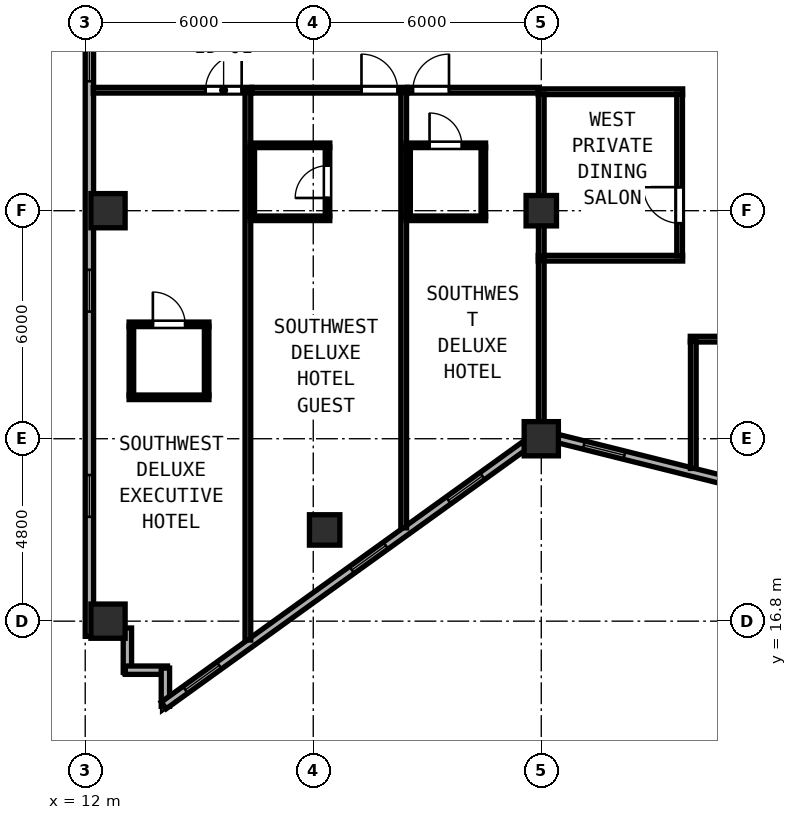
"""IFC4 building model, lengths in metres.
Left out: names, types, materials, properties, quantities, classifications, styles, units other than length and angle.
Written with IfcOpenShell. Run it as: python <this file> out.ifc"""

import sys

from ifc_helpers import new_model, si_unit, direction, frame, frame_2d, origin, origin_2d, place, context, subcontext, project, spatial, rectangle, hollow_rectangle, extrude, element, fill, save


model = new_model("IFC4")
c1 = context("Model", 3, precision=1e-05, world=origin(), true_north=direction((0.0, 1.0)))
c2 = subcontext(c1, "Body", "Model", "MODEL_VIEW")
j1 = project(units=[si_unit("LENGTHUNIT", "METRE"), si_unit("PLANEANGLEUNIT", "RADIAN")], contexts=[c1])
p1 = place(None, origin())
s1 = spatial("IfcSite", under=j1, at=p1, CompositionType="ELEMENT")
p2 = place(p1, origin())
s2 = spatial("IfcBuilding", under=s1, at=p2, CompositionType="ELEMENT")
p3 = place(p2, frame((0.0, 0.0, 223.0)))
s3 = spatial("IfcBuildingStorey", under=s2, at=p3, CompositionType="ELEMENT", Elevation=223.0)
for number, where, z_axis, x_axis in (
    (1, (24.0, 21.6, 0.0), (0.0, 0.0, 1.0), (1.0, 0.0, 0.0)),
    (2, (12.6, 16.8, 0.0), (0.0, 0.0, 1.0), (1.0, 0.0, 0.0)),
    (3, (12.6, 27.6, 0.0), (0.0, 0.0, 1.0), (1.0, 0.0, 0.0)),
):
    element("IfcColumn", number, at=place(p3, frame(where, z_axis=z_axis, x_axis=x_axis)), inside=s3, PredefinedType="COLUMN", context=c2, shape_type="SweptSolid", body=[
        extrude(hollow_rectangle(XDim=0.9, YDim=0.9, WallThickness=0.034, at=origin_2d()), origin(), (0.0, 0.0, 1.0), 3.8),
    ])
for number, where, z_axis, x_axis in (
    (4, (24.0, 27.6, 0.0), (0.0, 0.0, 1.0), (1.0, 0.0, 0.0)),
    (5, (18.3, 19.2, 0.0), (0.0, 0.0, 1.0), (1.0, 0.0, 0.0)),
):
    element("IfcColumn", number, at=place(p3, frame(where, z_axis=z_axis, x_axis=x_axis)), inside=s3, PredefinedType="COLUMN", context=c2, shape_type="SweptSolid", body=[
        extrude(hollow_rectangle(XDim=0.8, YDim=0.8, WallThickness=0.03, at=origin_2d()), origin(), (0.0, 0.0, 1.0), 3.8),
    ])
p4 = place(p3, frame((12.11, 37.545, 0.0), z_axis=(0.0, 0.0, 1.0), x_axis=(0.0, -1.0, 0.0)))
e6 = element("IfcWall", 6, at=p4, inside=s3, PredefinedType="SOLIDWALL", context=c2, shape_type="SweptSolid", body=[
    extrude(rectangle(XDim=21.145, YDim=0.22, at=frame_2d((10.573, 0.0))), origin(), (0.0, 0.0, 1.0), 3.62),
])
p5 = place(p4, frame((0.7, 0.0, 0.85)))
e7 = element("IfcOpeningElement", 7, at=p5, cuts=e6, PredefinedType="OPENING", context=c2, shape_type="SweptSolid", body=[
    extrude(rectangle(XDim=1.1, YDim=1.75, at=frame_2d((0.55, 0.875))), frame((0.0, 0.12, 0.0), z_axis=(0.0, -1.0, 0.0), x_axis=(1.0, 0.0, 0.0)), (0.0, 0.0, 1.0), 0.24),
])
p6 = place(p4, frame((5.44, 0.0, 0.85)))
e8 = element("IfcOpeningElement", 8, at=p6, cuts=e6, PredefinedType="OPENING", context=c2, shape_type="SweptSolid", body=[
    extrude(rectangle(XDim=1.1, YDim=1.75, at=frame_2d((0.55, 0.875))), frame((0.0, 0.12, 0.0), z_axis=(0.0, -1.0, 0.0), x_axis=(1.0, 0.0, 0.0)), (0.0, 0.0, 1.0), 0.24),
])
p7 = place(p4, frame((11.5, 0.0, 0.85)))
e9 = element("IfcOpeningElement", 9, at=p7, cuts=e6, PredefinedType="OPENING", context=c2, shape_type="SweptSolid", body=[
    extrude(rectangle(XDim=1.1, YDim=1.75, at=frame_2d((0.55, 0.875))), frame((0.0, 0.12, 0.0), z_axis=(0.0, -1.0, 0.0), x_axis=(1.0, 0.0, 0.0)), (0.0, 0.0, 1.0), 0.24),
])
p8 = place(p4, frame((16.9, 0.0, 0.85)))
e10 = element("IfcOpeningElement", 10, at=p8, cuts=e6, PredefinedType="OPENING", context=c2, shape_type="SweptSolid", body=[
    extrude(rectangle(XDim=1.1, YDim=1.75, at=frame_2d((0.55, 0.875))), frame((0.0, 0.12, 0.0), z_axis=(0.0, -1.0, 0.0), x_axis=(1.0, 0.0, 0.0)), (0.0, 0.0, 1.0), 0.24),
])
p9 = place(p3, frame((13.11, 16.62, 0.0), z_axis=(0.0, 0.0, 1.0), x_axis=(0.0, -1.0, 0.0)))
e11 = element("IfcWall", 11, at=p9, inside=s3, PredefinedType="SOLIDWALL", context=c2, shape_type="SweptSolid", body=[
    extrude(rectangle(XDim=1.165, YDim=0.22, at=frame_2d((0.583, 0.0))), origin(), (0.0, 0.0, 1.0), 3.62),
])
p10 = place(p3, frame((13.055, 15.51, 0.0), z_axis=(0.0, 0.0, 1.0), x_axis=(1.0, 0.0, 0.0)))
e12 = element("IfcWall", 12, at=p10, inside=s3, PredefinedType="SOLIDWALL", context=c2, shape_type="SweptSolid", body=[
    extrude(rectangle(XDim=1.11, YDim=0.22, at=frame_2d((0.555, 0.0))), origin(), (0.0, 0.0, 1.0), 3.62),
])
p11 = place(p3, frame((14.11, 15.565, 0.0), z_axis=(0.0, 0.0, 1.0), x_axis=(0.0, -1.0, 0.0)))
e13 = element("IfcWall", 13, at=p11, inside=s3, PredefinedType="SOLIDWALL", context=c2, shape_type="SweptSolid", body=[
    extrude(rectangle(XDim=1.005, YDim=0.22, at=frame_2d((0.502, 0.0))), origin(), (0.0, 0.0, 1.0), 3.62),
])
p12 = place(p3, frame((14.065, 14.583, 0.0), z_axis=(0.0, 0.0, 1.0), x_axis=(0.811534737332, 0.58430417601, 0.0)))
e14 = element("IfcWall", 14, at=p12, inside=s3, PredefinedType="SOLIDWALL", context=c2, shape_type="SweptSolid", body=[
    extrude(rectangle(XDim=11.697, YDim=0.22, at=frame_2d((5.849, 0.0))), origin(), (0.0, 0.0, 1.0), 3.215),
])
p13 = place(p12, frame((0.7, 0.0, 0.85)))
e15 = element("IfcOpeningElement", 15, at=p13, cuts=e14, PredefinedType="OPENING", context=c2, shape_type="SweptSolid", body=[
    extrude(rectangle(XDim=1.1, YDim=1.75, at=frame_2d((0.55, 0.875))), frame((0.0, 0.12, 0.0), z_axis=(0.0, -1.0, 0.0), x_axis=(1.0, 0.0, 0.0)), (0.0, 0.0, 1.0), 0.24),
])
p14 = place(p12, frame((6.1, 0.0, 0.85)))
e16 = element("IfcOpeningElement", 16, at=p14, cuts=e14, PredefinedType="OPENING", context=c2, shape_type="SweptSolid", body=[
    extrude(rectangle(XDim=1.1, YDim=1.75, at=frame_2d((0.55, 0.875))), frame((0.0, 0.12, 0.0), z_axis=(0.0, -1.0, 0.0), x_axis=(1.0, 0.0, 0.0)), (0.0, 0.0, 1.0), 0.24),
])
p15 = place(p12, frame((9.233, 0.0, 0.85)))
e17 = element("IfcOpeningElement", 17, at=p15, cuts=e14, PredefinedType="OPENING", context=c2, shape_type="SweptSolid", body=[
    extrude(rectangle(XDim=1.1, YDim=1.75, at=frame_2d((0.55, 0.875))), frame((0.0, 0.12, 0.0), z_axis=(0.0, -1.0, 0.0), x_axis=(1.0, 0.0, 0.0)), (0.0, 0.0, 1.0), 0.24),
])
p16 = place(p3, frame((24.442, 21.603, 0.0), z_axis=(0.0, 0.0, 1.0), x_axis=(0.970145648609, -0.242523030833, 0.0)))
e18 = element("IfcWall", 18, at=p16, inside=s3, PredefinedType="SOLIDWALL", context=c2, shape_type="SweptSolid", body=[
    extrude(rectangle(XDim=4.561, YDim=0.22, at=frame_2d((2.281, 0.0))), origin(), (0.0, 0.0, 1.0), 3.215),
])
p17 = place(p16, frame((0.7, 0.0, 0.85)))
e19 = element("IfcOpeningElement", 19, at=p17, cuts=e18, PredefinedType="OPENING", context=c2, shape_type="SweptSolid", body=[
    extrude(rectangle(XDim=1.1, YDim=1.75, at=frame_2d((0.55, 0.875))), frame((0.0, 0.12, 0.0), z_axis=(0.0, -1.0, 0.0), x_axis=(1.0, 0.0, 0.0)), (0.0, 0.0, 1.0), 0.24),
])
for number, where, z_axis, x_axis in (
    (20, (23.92, 30.73, 0.0), (0.0, 0.0, 1.0), (1.0, 0.0, 0.0)),
    (21, (23.92, 26.35, 0.0), (0.0, 0.0, 1.0), (1.0, 0.0, 0.0)),
):
    element("IfcWall", number, at=place(p3, frame(where, z_axis=z_axis, x_axis=x_axis)), inside=s3, PredefinedType="PARTITIONING", context=c2, shape_type="SweptSolid", body=[
        extrude(rectangle(XDim=3.8, YDim=0.15, at=frame_2d((1.9, 0.0))), origin(), (0.0, 0.0, 1.0), 3.62),
    ])
p18 = place(p3, frame((24.0, 26.41, 0.0), z_axis=(0.0, 0.0, 1.0), x_axis=(0.0, 1.0, 0.0)))
e22 = element("IfcWall", 22, at=p18, inside=s3, PredefinedType="PARTITIONING", context=c2, shape_type="SweptSolid", body=[
    extrude(rectangle(XDim=4.26, YDim=0.15, at=frame_2d((2.13, 0.0))), origin(), (0.0, 0.0, 1.0), 3.215),
])
p19 = place(p3, frame((27.64, 26.41, 0.0), z_axis=(0.0, 0.0, 1.0), x_axis=(0.0, 1.0, 0.0)))
e23 = element("IfcWall", 23, at=p19, inside=s3, PredefinedType="PARTITIONING", context=c2, shape_type="SweptSolid", body=[
    extrude(rectangle(XDim=4.26, YDim=0.15, at=frame_2d((2.13, 0.0))), origin(), (0.0, 0.0, 1.0), 3.62),
])
p20 = place(p19, frame((1.81, 0.0, 0.0), z_axis=(0.0, 0.0, 1.0), x_axis=(-1.0, 0.0, 0.0)))
e24 = element("IfcOpeningElement", 24, at=p20, cuts=e23, PredefinedType="OPENING", context=c2, shape_type="SweptSolid", body=[
    extrude(rectangle(XDim=0.95, YDim=2.12, at=frame_2d((0.475, 1.06))), frame((0.0, 0.085, 0.0), z_axis=(0.0, -1.0, 0.0), x_axis=(1.0, 0.0, 0.0)), (0.0, 0.0, 1.0), 0.17),
])
p21 = place(p3, frame((27.92, 24.22, 0.0), z_axis=(0.0, 0.0, 1.0), x_axis=(1.0, 0.0, 0.0)))
e25 = element("IfcWall", 25, at=p21, inside=s3, PredefinedType="PARTITIONING", context=c2, shape_type="SweptSolid", body=[
    extrude(rectangle(XDim=7.36, YDim=0.15, at=frame_2d((3.68, 0.0))), origin(), (0.0, 0.0, 1.0), 3.62),
])
p22 = place(p21, frame((4.075, 0.0, 0.0), z_axis=(0.0, 0.0, 1.0), x_axis=(-1.0, 0.0, 0.0)))
e26 = element("IfcOpeningElement", 26, at=p22, cuts=e25, PredefinedType="OPENING", context=c2, shape_type="SweptSolid", body=[
    extrude(rectangle(XDim=0.95, YDim=2.12, at=frame_2d((0.475, 1.06))), frame((0.0, 0.085, 0.0), z_axis=(0.0, -1.0, 0.0), x_axis=(1.0, 0.0, 0.0)), (0.0, 0.0, 1.0), 0.17),
])
p23 = place(p3, frame((28.0, 20.819, 0.0), z_axis=(0.0, 0.0, 1.0), x_axis=(0.0, 1.0, 0.0)))
e27 = element("IfcWall", 27, at=p23, inside=s3, PredefinedType="PARTITIONING", context=c2, shape_type="SweptSolid", body=[
    extrude(rectangle(XDim=3.341, YDim=0.15, at=frame_2d((1.671, 0.0))), origin(), (0.0, 0.0, 1.0), 3.62),
])
p24 = place(p3, frame((12.212, 30.77, 0.0), z_axis=(0.0, 0.0, 1.0), x_axis=(1.0, 0.0, 0.0)))
e28 = element("IfcWall", 28, at=p24, inside=s3, PredefinedType="PARTITIONING", context=c2, shape_type="SweptSolid", body=[
    extrude(rectangle(XDim=4.168, YDim=0.15, at=frame_2d((2.084, 0.0))), origin(), (0.0, 0.0, 1.0), 3.62),
])
p25 = place(p24, frame((3.905, 0.0, 0.0), z_axis=(0.0, 0.0, 1.0), x_axis=(-1.0, 0.0, 0.0)))
e29 = element("IfcOpeningElement", 29, at=p25, cuts=e28, PredefinedType="OPENING", context=c2, shape_type="SweptSolid", body=[
    extrude(rectangle(XDim=0.95, YDim=2.18, at=frame_2d((0.475, 1.09))), frame((0.0, 0.085, 0.0), z_axis=(0.0, -1.0, 0.0), x_axis=(1.0, 0.0, 0.0)), (0.0, 0.0, 1.0), 0.17),
])
p26 = place(p3, frame((16.28, 16.303, 0.0), z_axis=(0.0, 0.0, 1.0), x_axis=(0.0, 1.0, 0.0)))
e30 = element("IfcWall", 30, at=p26, inside=s3, PredefinedType="PARTITIONING", context=c2, shape_type="SweptSolid", body=[
    extrude(rectangle(XDim=14.407, YDim=0.15, at=frame_2d((7.204, 0.0))), origin(), (0.0, 0.0, 1.0), 3.62),
])
p27 = place(p3, frame((13.155, 24.61, 0.0), z_axis=(0.0, 0.0, 1.0), x_axis=(1.0, 0.0, 0.0)))
e31 = element("IfcWall", 31, at=p27, inside=s3, PredefinedType="PARTITIONING", context=c2, shape_type="SweptSolid", body=[
    extrude(rectangle(XDim=2.1, YDim=0.12, at=frame_2d((1.05, 0.0))), origin(), (0.0, 0.0, 1.0), 3.62),
])
p28 = place(p27, frame((1.475, 0.0, 0.0), z_axis=(0.0, 0.0, 1.0), x_axis=(-1.0, 0.0, 0.0)))
e32 = element("IfcOpeningElement", 32, at=p28, cuts=e31, PredefinedType="OPENING", context=c2, shape_type="SweptSolid", body=[
    extrude(rectangle(XDim=0.85, YDim=2.1, at=frame_2d((0.425, 1.05))), frame((0.0, 0.07, 0.0), z_axis=(0.0, -1.0, 0.0), x_axis=(1.0, 0.0, 0.0)), (0.0, 0.0, 1.0), 0.14),
])
p29 = place(p3, frame((13.155, 22.69, 0.0), z_axis=(0.0, 0.0, 1.0), x_axis=(1.0, 0.0, 0.0)))
e33 = element("IfcWall", 33, at=p29, inside=s3, PredefinedType="PARTITIONING", context=c2, shape_type="SweptSolid", body=[
    extrude(rectangle(XDim=2.1, YDim=0.12, at=frame_2d((1.05, 0.0))), origin(), (0.0, 0.0, 1.0), 3.62),
])
for number, where, z_axis, x_axis in (
    (34, (13.215, 22.735, 0.0), (0.0, 0.0, 1.0), (0.0, 1.0, 0.0)),
    (35, (15.195, 22.735, 0.0), (0.0, 0.0, 1.0), (0.0, 1.0, 0.0)),
):
    element("IfcWall", number, at=place(p3, frame(where, z_axis=z_axis, x_axis=x_axis)), inside=s3, PredefinedType="PARTITIONING", context=c2, shape_type="SweptSolid", body=[
        extrude(rectangle(XDim=1.83, YDim=0.12, at=frame_2d((0.915, 0.0))), origin(), (0.0, 0.0, 1.0), 3.62),
    ])
p30 = place(p3, frame((16.382, 30.77, 0.0), z_axis=(0.0, 0.0, 1.0), x_axis=(1.0, 0.0, 0.0)))
e36 = element("IfcWall", 36, at=p30, inside=s3, PredefinedType="PARTITIONING", context=c2, shape_type="SweptSolid", body=[
    extrude(rectangle(XDim=4.098, YDim=0.15, at=frame_2d((2.049, 0.0))), origin(), (0.0, 0.0, 1.0), 3.62),
])
p31 = place(p30, frame((3.837, 0.0, 0.0), z_axis=(0.0, 0.0, 1.0), x_axis=(-1.0, 0.0, 0.0)))
e37 = element("IfcOpeningElement", 37, at=p31, cuts=e36, PredefinedType="OPENING", context=c2, shape_type="SweptSolid", body=[
    extrude(rectangle(XDim=0.95, YDim=2.15, at=frame_2d((0.475, 1.075))), frame((0.0, 0.085, 0.0), z_axis=(0.0, -1.0, 0.0), x_axis=(1.0, 0.0, 0.0)), (0.0, 0.0, 1.0), 0.17),
])
p32 = place(p3, frame((20.38, 19.255, 0.0), z_axis=(0.0, 0.0, 1.0), x_axis=(0.0, 1.0, 0.0)))
e38 = element("IfcWall", 38, at=p32, inside=s3, PredefinedType="PARTITIONING", context=c2, shape_type="SweptSolid", body=[
    extrude(rectangle(XDim=11.455, YDim=0.15, at=frame_2d((5.728, 0.0))), origin(), (0.0, 0.0, 1.0), 3.62),
])
p33 = place(p3, frame((16.34, 29.32, 0.0), z_axis=(0.0, 0.0, 1.0), x_axis=(1.0, 0.0, 0.0)))
e39 = element("IfcWall", 39, at=p33, inside=s3, PredefinedType="PARTITIONING", context=c2, shape_type="SweptSolid", body=[
    extrude(rectangle(XDim=2.095, YDim=0.12, at=frame_2d((1.047, 0.0))), origin(), (0.0, 0.0, 1.0), 3.62),
])
p34 = place(p3, frame((16.34, 27.4, 0.0), z_axis=(0.0, 0.0, 1.0), x_axis=(1.0, 0.0, 0.0)))
e40 = element("IfcWall", 40, at=p34, inside=s3, PredefinedType="PARTITIONING", context=c2, shape_type="SweptSolid", body=[
    extrude(rectangle(XDim=2.095, YDim=0.12, at=frame_2d((1.047, 0.0))), origin(), (0.0, 0.0, 1.0), 3.215),
])
p35 = place(p3, frame((16.395, 27.445, 0.0), z_axis=(0.0, 0.0, 1.0), x_axis=(0.0, 1.0, 0.0)))
e41 = element("IfcWall", 41, at=p35, inside=s3, PredefinedType="PARTITIONING", context=c2, shape_type="SweptSolid", body=[
    extrude(rectangle(XDim=1.83, YDim=0.12, at=frame_2d((0.915, 0.0))), origin(), (0.0, 0.0, 1.0), 3.62),
])
p36 = place(p3, frame((18.375, 27.445, 0.0), z_axis=(0.0, 0.0, 1.0), x_axis=(0.0, 1.0, 0.0)))
e42 = element("IfcWall", 42, at=p36, inside=s3, PredefinedType="PARTITIONING", context=c2, shape_type="SweptSolid", body=[
    extrude(rectangle(XDim=1.83, YDim=0.12, at=frame_2d((0.915, 0.0))), origin(), (0.0, 0.0, 1.0), 3.62),
])
p37 = place(p36, frame((0.49, 0.0, 0.0)))
e43 = element("IfcOpeningElement", 43, at=p37, cuts=e42, PredefinedType="OPENING", context=c2, shape_type="SweptSolid", body=[
    extrude(rectangle(XDim=0.85, YDim=2.1, at=frame_2d((0.425, 1.05))), frame((0.0, 0.07, 0.0), z_axis=(0.0, -1.0, 0.0), x_axis=(1.0, 0.0, 0.0)), (0.0, 0.0, 1.0), 0.14),
])
p38 = place(p3, frame((20.482, 30.77, 0.0), z_axis=(0.0, 0.0, 1.0), x_axis=(1.0, 0.0, 0.0)))
e44 = element("IfcWall", 44, at=p38, inside=s3, PredefinedType="PARTITIONING", context=c2, shape_type="SweptSolid", body=[
    extrude(rectangle(XDim=3.436, YDim=0.15, at=frame_2d((1.718, 0.0))), origin(), (0.0, 0.0, 1.0), 3.62),
])
p39 = place(p38, frame((1.09, 0.0, 0.0), z_axis=(0.0, 0.0, 1.0), x_axis=(-1.0, 0.0, 0.0)))
e45 = element("IfcOpeningElement", 45, at=p39, cuts=e44, PredefinedType="OPENING", context=c2, shape_type="SweptSolid", body=[
    extrude(rectangle(XDim=0.95, YDim=2.15, at=frame_2d((0.475, 1.075))), frame((0.0, 0.085, 0.0), z_axis=(0.0, -1.0, 0.0), x_axis=(1.0, 0.0, 0.0)), (0.0, 0.0, 1.0), 0.17),
])
p40 = place(p3, frame((24.0, 21.819, 0.0), z_axis=(0.0, 0.0, 1.0), x_axis=(0.0, 1.0, 0.0)))
e46 = element("IfcWall", 46, at=p40, inside=s3, PredefinedType="PARTITIONING", context=c2, shape_type="SweptSolid", body=[
    extrude(rectangle(XDim=4.471, YDim=0.15, at=frame_2d((2.236, 0.0))), origin(), (0.0, 0.0, 1.0), 3.215),
])
p41 = place(p3, frame((20.44, 29.32, 0.0), z_axis=(0.0, 0.0, 1.0), x_axis=(1.0, 0.0, 0.0)))
e47 = element("IfcWall", 47, at=p41, inside=s3, PredefinedType="PARTITIONING", context=c2, shape_type="SweptSolid", body=[
    extrude(rectangle(XDim=2.095, YDim=0.12, at=frame_2d((1.047, 0.0))), origin(), (0.0, 0.0, 1.0), 3.62),
])
p42 = place(p41, frame((1.47, 0.0, 0.0), z_axis=(0.0, 0.0, 1.0), x_axis=(-1.0, 0.0, 0.0)))
e48 = element("IfcOpeningElement", 48, at=p42, cuts=e47, PredefinedType="OPENING", context=c2, shape_type="SweptSolid", body=[
    extrude(rectangle(XDim=0.85, YDim=2.1, at=frame_2d((0.425, 1.05))), frame((0.0, 0.07, 0.0), z_axis=(0.0, -1.0, 0.0), x_axis=(1.0, 0.0, 0.0)), (0.0, 0.0, 1.0), 0.14),
])
p43 = place(p3, frame((20.44, 27.4, 0.0), z_axis=(0.0, 0.0, 1.0), x_axis=(1.0, 0.0, 0.0)))
e49 = element("IfcWall", 49, at=p43, inside=s3, PredefinedType="PARTITIONING", context=c2, shape_type="SweptSolid", body=[
    extrude(rectangle(XDim=2.095, YDim=0.12, at=frame_2d((1.047, 0.0))), origin(), (0.0, 0.0, 1.0), 3.215),
])
for number, where, z_axis, x_axis in (
    (50, (20.495, 27.445, 0.0), (0.0, 0.0, 1.0), (0.0, 1.0, 0.0)),
    (51, (22.475, 27.445, 0.0), (0.0, 0.0, 1.0), (0.0, 1.0, 0.0)),
):
    element("IfcWall", number, at=place(p3, frame(where, z_axis=z_axis, x_axis=x_axis)), inside=s3, PredefinedType="PARTITIONING", context=c2, shape_type="SweptSolid", body=[
        extrude(rectangle(XDim=1.83, YDim=0.12, at=frame_2d((0.915, 0.0))), origin(), (0.0, 0.0, 1.0), 3.62),
    ])
p44 = place(p6, origin())
e52 = element("IfcWindow", 52, at=p44, inside=s3, PartitioningType="SINGLE_PANEL", PredefinedType="WINDOW", context=c2, shape_type="SweptSolid", body=[
    extrude(rectangle(XDim=1.1, YDim=1.75, at=frame_2d((0.55, 0.875))), frame((0.0, 0.03, 0.0), z_axis=(0.0, -1.0, 0.0), x_axis=(1.0, 0.0, 0.0)), (0.0, 0.0, 1.0), 0.06),
])
fill(e8, e52)
p45 = place(p7, origin())
e53 = element("IfcWindow", 53, at=p45, inside=s3, PartitioningType="SINGLE_PANEL", PredefinedType="WINDOW", context=c2, shape_type="SweptSolid", body=[
    extrude(rectangle(XDim=1.1, YDim=1.75, at=frame_2d((0.55, 0.875))), frame((0.0, 0.03, 0.0), z_axis=(0.0, -1.0, 0.0), x_axis=(1.0, 0.0, 0.0)), (0.0, 0.0, 1.0), 0.06),
])
fill(e9, e53)
p46 = place(p8, origin())
e54 = element("IfcWindow", 54, at=p46, inside=s3, PartitioningType="SINGLE_PANEL", PredefinedType="WINDOW", context=c2, shape_type="SweptSolid", body=[
    extrude(rectangle(XDim=1.1, YDim=1.75, at=frame_2d((0.55, 0.875))), frame((0.0, 0.03, 0.0), z_axis=(0.0, -1.0, 0.0), x_axis=(1.0, 0.0, 0.0)), (0.0, 0.0, 1.0), 0.06),
])
fill(e10, e54)
p47 = place(p13, origin())
e55 = element("IfcWindow", 55, at=p47, inside=s3, PartitioningType="SINGLE_PANEL", PredefinedType="WINDOW", context=c2, shape_type="SweptSolid", body=[
    extrude(rectangle(XDim=1.1, YDim=1.75, at=frame_2d((0.55, 0.875))), frame((0.0, 0.03, 0.0), z_axis=(0.0, -1.0, 0.0), x_axis=(1.0, 0.0, 0.0)), (0.0, 0.0, 1.0), 0.06),
])
fill(e15, e55)
p48 = place(p14, origin())
e56 = element("IfcWindow", 56, at=p48, inside=s3, PartitioningType="SINGLE_PANEL", PredefinedType="WINDOW", context=c2, shape_type="SweptSolid", body=[
    extrude(rectangle(XDim=1.1, YDim=1.75, at=frame_2d((0.55, 0.875))), frame((0.0, 0.03, 0.0), z_axis=(0.0, -1.0, 0.0), x_axis=(1.0, 0.0, 0.0)), (0.0, 0.0, 1.0), 0.06),
])
fill(e16, e56)
p49 = place(p17, origin())
e57 = element("IfcWindow", 57, at=p49, inside=s3, PartitioningType="SINGLE_PANEL", PredefinedType="WINDOW", context=c2, shape_type="SweptSolid", body=[
    extrude(rectangle(XDim=1.1, YDim=1.75, at=frame_2d((0.55, 0.875))), frame((0.0, 0.03, 0.0), z_axis=(0.0, -1.0, 0.0), x_axis=(1.0, 0.0, 0.0)), (0.0, 0.0, 1.0), 0.06),
])
fill(e19, e57)
p50 = place(p20, origin())
e58 = element("IfcDoor", 58, at=p50, inside=s3, OperationType="SINGLE_SWING_LEFT", PredefinedType="DOOR", context=c2, shape_type="SweptSolid", body=[
    extrude(rectangle(XDim=0.95, YDim=2.12, at=frame_2d((0.475, 1.06))), frame((0.0, 0.025, 0.0), z_axis=(0.0, -1.0, 0.0), x_axis=(1.0, 0.0, 0.0)), (0.0, 0.0, 1.0), 0.05),
])
fill(e24, e58)
p51 = place(p25, origin())
e59 = element("IfcDoor", 59, at=p51, inside=s3, OperationType="SINGLE_SWING_LEFT", PredefinedType="DOOR", context=c2, shape_type="SweptSolid", body=[
    extrude(rectangle(XDim=0.95, YDim=2.18, at=frame_2d((0.475, 1.09))), frame((0.0, 0.025, 0.0), z_axis=(0.0, -1.0, 0.0), x_axis=(1.0, 0.0, 0.0)), (0.0, 0.0, 1.0), 0.05),
])
fill(e29, e59)
p52 = place(p28, origin())
e60 = element("IfcDoor", 60, at=p52, inside=s3, OperationType="SINGLE_SWING_RIGHT", PredefinedType="DOOR", context=c2, shape_type="SweptSolid", body=[
    extrude(rectangle(XDim=0.85, YDim=2.1, at=frame_2d((0.425, 1.05))), frame((0.0, 0.025, 0.0), z_axis=(0.0, -1.0, 0.0), x_axis=(1.0, 0.0, 0.0)), (0.0, 0.0, 1.0), 0.05),
])
fill(e32, e60)
p53 = place(p31, origin())
e61 = element("IfcDoor", 61, at=p53, inside=s3, OperationType="SINGLE_SWING_RIGHT", PredefinedType="DOOR", context=c2, shape_type="SweptSolid", body=[
    extrude(rectangle(XDim=0.95, YDim=2.15, at=frame_2d((0.475, 1.075))), frame((0.0, 0.025, 0.0), z_axis=(0.0, -1.0, 0.0), x_axis=(1.0, 0.0, 0.0)), (0.0, 0.0, 1.0), 0.05),
])
fill(e37, e61)
p54 = place(p37, origin())
e62 = element("IfcDoor", 62, at=p54, inside=s3, OperationType="SINGLE_SWING_LEFT", PredefinedType="DOOR", context=c2, shape_type="SweptSolid", body=[
    extrude(rectangle(XDim=0.85, YDim=2.1, at=frame_2d((0.425, 1.05))), frame((0.0, 0.025, 0.0), z_axis=(0.0, -1.0, 0.0), x_axis=(1.0, 0.0, 0.0)), (0.0, 0.0, 1.0), 0.05),
])
fill(e43, e62)
p55 = place(p39, origin())
e63 = element("IfcDoor", 63, at=p55, inside=s3, OperationType="SINGLE_SWING_LEFT", PredefinedType="DOOR", context=c2, shape_type="SweptSolid", body=[
    extrude(rectangle(XDim=0.95, YDim=2.15, at=frame_2d((0.475, 1.075))), frame((0.0, 0.025, 0.0), z_axis=(0.0, -1.0, 0.0), x_axis=(1.0, 0.0, 0.0)), (0.0, 0.0, 1.0), 0.05),
])
fill(e45, e63)
p56 = place(p42, origin())
e64 = element("IfcDoor", 64, at=p56, inside=s3, OperationType="SINGLE_SWING_RIGHT", PredefinedType="DOOR", context=c2, shape_type="SweptSolid", body=[
    extrude(rectangle(XDim=0.85, YDim=2.1, at=frame_2d((0.425, 1.05))), frame((0.0, 0.025, 0.0), z_axis=(0.0, -1.0, 0.0), x_axis=(1.0, 0.0, 0.0)), (0.0, 0.0, 1.0), 0.05),
])
fill(e48, e64)
p57 = place(p15, origin())
e65 = element("IfcWindow", 65, at=p57, inside=s3, PartitioningType="SINGLE_PANEL", PredefinedType="WINDOW", context=c2, shape_type="SweptSolid", body=[
    extrude(rectangle(XDim=1.1, YDim=1.75, at=frame_2d((0.55, 0.875))), frame((0.0, 0.03, 0.0), z_axis=(0.0, -1.0, 0.0), x_axis=(1.0, 0.0, 0.0)), (0.0, 0.0, 1.0), 0.06),
])
fill(e17, e65)
save(model, sys.argv[1])
